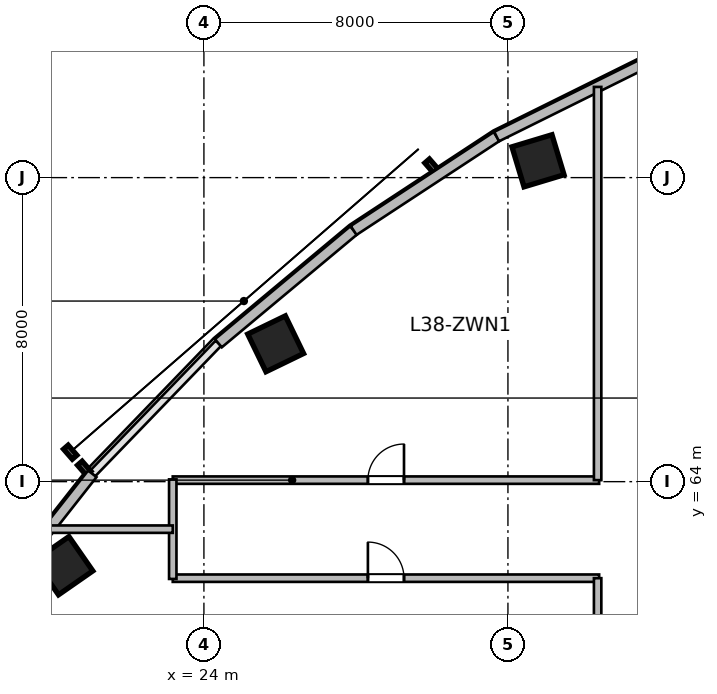
"""IFC4 building model, lengths in metres.
Left out: names, types, materials, properties, quantities, classifications, styles, units other than length and angle.
Written with IfcOpenShell. Run it as: python <this file> out.ifc"""

import sys

from ifc_helpers import new_model, si_unit, direction, frame, frame_2d, origin, origin_2d, place, context, subcontext, project, spatial, rectangle, extrude, source, transform, mapped, element, fill, save


model = new_model("IFC4")
c1 = context("Model", 3, precision=1e-05, world=origin(), true_north=direction((0.0, 1.0)))
c2 = subcontext(c1, "Body", "Model", "MODEL_VIEW")
j1 = project(units=[si_unit("LENGTHUNIT", "METRE"), si_unit("PLANEANGLEUNIT", "RADIAN")], contexts=[c1])
p1 = place(None, origin())
s1 = spatial("IfcSite", under=j1, at=p1, CompositionType="ELEMENT")
p2 = place(p1, origin())
s2 = spatial("IfcBuilding", under=s1, at=p2, CompositionType="ELEMENT")
p3 = place(p2, frame((0.0, 0.0, 158.4)))
s3 = spatial("IfcBuildingStorey", under=s2, at=p3, CompositionType="ELEMENT", Elevation=158.4)
m1 = source(origin(), c2, "Body", "SweptSolid", [
    extrude(rectangle(XDim=1.1, YDim=1.1, at=origin_2d()), origin(), (0.0, 0.0, 1.0), 3.9),
])
for number, where, z_axis, x_axis in (
    (1, (20.311, 61.789, 0.0), (0.0, 0.0, 1.0), (-0.571, 0.821, 0.0)),
    (2, (25.888, 67.627, 0.0), (0.0, 0.0, 1.0), (-0.436, 0.9, 0.0)),
    (3, (32.791, 72.442, 0.0), (0.0, 0.0, 1.0), (-0.289, 0.957, 0.0)),
):
    element("IfcColumn", number, at=place(p3, frame(where, z_axis=z_axis, x_axis=x_axis)), inside=s3, PredefinedType="COLUMN", context=c2, shape_type="MappedRepresentation", body=[
        mapped(m1, transform((0.0, 0.0, 0.0), scale=1.0)),
    ])
m2 = source(origin(), c2, "Body", "SweptSolid", [
    extrude(rectangle(XDim=4.922, YDim=0.28, at=frame_2d((2.461, 0.0))), origin(), (0.0, 0.0, 1.0), 3.65),
])
p4 = place(p3, frame((18.021, 60.338, 0.0), z_axis=(0.0, 0.0, 1.0), x_axis=(0.61817639101, 0.786039407153, 0.0)))
e4 = element("IfcWall", 4, at=p4, inside=s3, PredefinedType="SOLIDWALL", context=c2, shape_type="MappedRepresentation", body=[
    mapped(m2, transform((0.0, 0.0, 0.0), scale=1.0)),
])
m3 = source(origin(), c2, "Body", "SweptSolid", [
    extrude(rectangle(XDim=4.634, YDim=0.28, at=frame_2d((2.317, 0.0))), origin(), (0.0, 0.0, 1.0), 3.65),
])
p5 = place(p3, frame((24.381, 67.642, 0.0), z_axis=(0.0, 0.0, 1.0), x_axis=(0.767910229096, 0.640557475993, 0.0)))
e5 = element("IfcWall", 5, at=p5, inside=s3, PredefinedType="SOLIDWALL", context=c2, shape_type="MappedRepresentation", body=[
    mapped(m3, transform((0.0, 0.0, 0.0), scale=1.0)),
])
m4 = source(origin(), c2, "Body", "SweptSolid", [
    extrude(rectangle(XDim=4.501, YDim=0.28, at=frame_2d((2.25, 0.0))), origin(), (0.0, 0.0, 1.0), 3.65),
])
p6 = place(p3, frame((27.939, 70.61, 0.0), z_axis=(0.0, 0.0, 1.0), x_axis=(0.835984920737, 0.548752414391, 0.0)))
e6 = element("IfcWall", 6, at=p6, inside=s3, PredefinedType="SOLIDWALL", context=c2, shape_type="MappedRepresentation", body=[
    mapped(m4, transform((0.0, 0.0, 0.0), scale=1.0)),
])
m5 = source(origin(), c2, "Body", "SweptSolid", [
    extrude(rectangle(XDim=4.384, YDim=0.28, at=frame_2d((2.192, 0.0))), origin(), (0.0, 0.0, 1.0), 3.65),
])
p7 = place(p3, frame((31.702, 73.08, 0.0), z_axis=(0.0, 0.0, 1.0), x_axis=(0.895969968053, 0.444114643248, 0.0)))
e7 = element("IfcWall", 7, at=p7, inside=s3, PredefinedType="SOLIDWALL", context=c2, shape_type="MappedRepresentation", body=[
    mapped(m5, transform((0.0, 0.0, 0.0), scale=1.0)),
])
m6 = source(origin(), c2, "Body", "SweptSolid", [
    extrude(rectangle(XDim=11.22, YDim=0.195, at=frame_2d((5.61, 0.0))), origin(), (0.0, 0.0, 1.0), 3.65),
])
p8 = place(p3, frame((23.18, 64.04, 0.0), z_axis=(0.0, 0.0, 1.0), x_axis=(1.0, 0.0, 0.0)))
e8 = element("IfcWall", 8, at=p8, inside=s3, PredefinedType="PARTITIONING", context=c2, shape_type="MappedRepresentation", body=[
    mapped(m6, transform((0.0, 0.0, 0.0), scale=1.0)),
])
p9 = place(p8, frame((5.135, 0.0, 0.0)))
e9 = element("IfcOpeningElement", 9, at=p9, cuts=e8, PredefinedType="OPENING", context=c2, shape_type="SweptSolid", body=[
    extrude(rectangle(XDim=0.95, YDim=2.1, at=frame_2d((0.475, 1.05))), frame((0.0, 0.107, 0.0), z_axis=(0.0, -1.0, 0.0), x_axis=(1.0, 0.0, 0.0)), (0.0, 0.0, 1.0), 0.215),
])
p10 = place(p3, frame((23.18, 61.46, 0.0), z_axis=(0.0, 0.0, 1.0), x_axis=(1.0, 0.0, 0.0)))
e10 = element("IfcWall", 10, at=p10, inside=s3, PredefinedType="PARTITIONING", context=c2, shape_type="MappedRepresentation", body=[
    mapped(m6, transform((0.0, 0.0, 0.0), scale=1.0)),
])
p11 = place(p10, frame((5.135, 0.0, 0.0)))
e11 = element("IfcOpeningElement", 11, at=p11, cuts=e10, PredefinedType="OPENING", context=c2, shape_type="SweptSolid", body=[
    extrude(rectangle(XDim=0.95, YDim=2.1, at=frame_2d((0.475, 1.05))), frame((0.0, 0.107, 0.0), z_axis=(0.0, -1.0, 0.0), x_axis=(1.0, 0.0, 0.0)), (0.0, 0.0, 1.0), 0.215),
])
m7 = source(origin(), c2, "Body", "SweptSolid", [
    extrude(rectangle(XDim=12.126, YDim=0.195, at=frame_2d((6.063, 0.0))), origin(), (0.0, 0.0, 1.0), 3.65),
])
p12 = place(p3, frame((34.36, 49.334, 0.0), z_axis=(0.0, 0.0, 1.0), x_axis=(0.0, 1.0, 0.0)))
e12 = element("IfcWall", 12, at=p12, inside=s3, PredefinedType="PARTITIONING", context=c2, shape_type="MappedRepresentation", body=[
    mapped(m7, transform((0.0, 0.0, 0.0), scale=1.0)),
])
m8 = source(origin(), c2, "Body", "SweptSolid", [
    extrude(rectangle(XDim=10.346, YDim=0.195, at=frame_2d((5.173, 0.0))), origin(), (0.0, 0.0, 1.0), 3.65),
])
p13 = place(p3, frame((34.36, 64.04, 0.0), z_axis=(0.0, 0.0, 1.0), x_axis=(0.0, 1.0, 0.0)))
e13 = element("IfcWall", 13, at=p13, inside=s3, PredefinedType="PARTITIONING", context=c2, shape_type="MappedRepresentation", body=[
    mapped(m8, transform((0.0, 0.0, 0.0), scale=1.0)),
])
m9 = source(origin(), c2, "Body", "SweptSolid", [
    extrude(rectangle(XDim=2.62, YDim=0.195, at=frame_2d((1.31, 0.0))), origin(), (0.0, 0.0, 1.0), 3.65),
])
p14 = place(p3, frame((23.18, 61.44, 0.0), z_axis=(0.0, 0.0, 1.0), x_axis=(0.0, 1.0, 0.0)))
e14 = element("IfcWall", 14, at=p14, inside=s3, PredefinedType="PARTITIONING", context=c2, shape_type="MappedRepresentation", body=[
    mapped(m9, transform((0.0, 0.0, 0.0), scale=1.0)),
])
m10 = source(origin(), c2, "Body", "SweptSolid", [
    extrude(rectangle(XDim=3.249, YDim=0.195, at=frame_2d((1.625, 0.0))), origin(), (0.0, 0.0, 1.0), 3.65),
])
p15 = place(p3, frame((19.931, 62.75, 0.0), z_axis=(0.0, 0.0, 1.0), x_axis=(1.0, 0.0, 0.0)))
e15 = element("IfcWall", 15, at=p15, inside=s3, PredefinedType="PARTITIONING", context=c2, shape_type="MappedRepresentation", body=[
    mapped(m10, transform((0.0, 0.0, 0.0), scale=1.0)),
])
m11 = source(origin(), c2, "Body", "SweptSolid", [
    extrude(rectangle(XDim=0.95, YDim=2.1, at=frame_2d((0.475, 1.05))), frame((0.0, 0.025, 0.0), z_axis=(0.0, -1.0, 0.0), x_axis=(1.0, 0.0, 0.0)), (0.0, 0.0, 1.0), 0.05),
])
p16 = place(p9, origin())
e16 = element("IfcDoor", 16, at=p16, inside=s3, OperationType="SINGLE_SWING_RIGHT", PredefinedType="DOOR", context=c2, shape_type="MappedRepresentation", body=[
    mapped(m11, transform((0.0, 0.0, 0.0), scale=1.0)),
])
fill(e9, e16)
p17 = place(p11, origin())
e17 = element("IfcDoor", 17, at=p17, inside=s3, OperationType="SINGLE_SWING_LEFT", PredefinedType="DOOR", context=c2, shape_type="MappedRepresentation", body=[
    mapped(m11, transform((0.0, 0.0, 0.0), scale=1.0)),
])
fill(e11, e17)
save(model, sys.argv[1])
